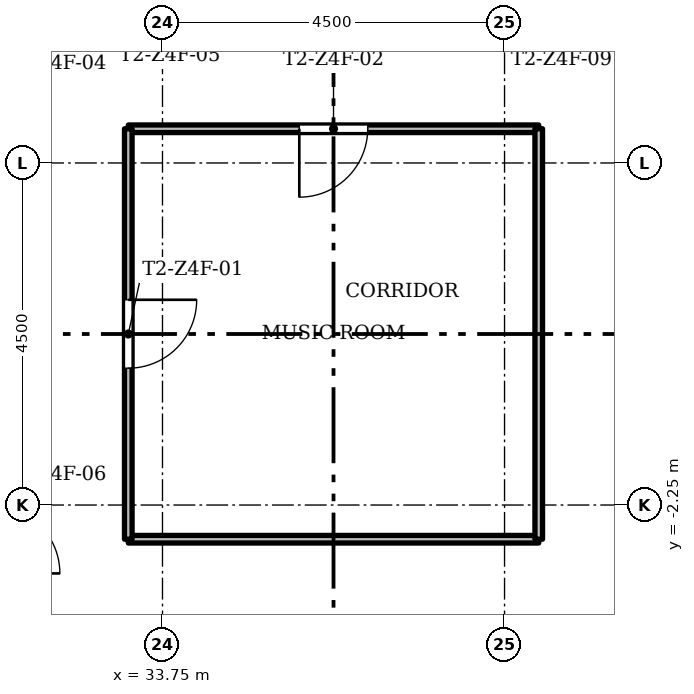
"""IFC4 building model, lengths in metres.
Left out: names, types, materials, properties, quantities, classifications, styles, units other than length and angle.
Written with IfcOpenShell. Run it as: python <this file> out.ifc"""

import sys

from ifc_helpers import new_model, si_unit, direction, frame, frame_2d, origin, place, context, subcontext, project, spatial, rectangle, extrude, element, fill, save


model = new_model("IFC4")
c1 = context("Model", 3, precision=1e-05, world=origin(), true_north=direction((0.0, 1.0)))
c2 = subcontext(c1, "Body", "Model", "MODEL_VIEW")
j1 = project(units=[si_unit("LENGTHUNIT", "METRE"), si_unit("PLANEANGLEUNIT", "RADIAN")], contexts=[c1])
p1 = place(None, origin())
s1 = spatial("IfcSite", under=j1, at=p1, CompositionType="ELEMENT")
p2 = place(p1, origin())
s2 = spatial("IfcBuilding", under=s1, at=p2, CompositionType="ELEMENT")
p3 = place(p2, frame((0.0, 0.0, 219.8)))
s3 = spatial("IfcBuildingStorey", under=s2, at=p3, CompositionType="ELEMENT", Elevation=219.8)
p4 = place(p3, frame((38.7, -2.7, 0.0), z_axis=(0.0, 0.0, 1.0), x_axis=(-1.0, 0.0, 0.0)))
e1 = element("IfcWall", 1, at=p4, inside=s3, PredefinedType="PARTITIONING", context=c2, shape_type="SweptSolid", body=[
    extrude(rectangle(XDim=5.4, YDim=0.1, at=frame_2d((2.7, 0.0))), origin(), (0.0, 0.0, 1.0), 3.0),
])
p5 = place(p3, frame((38.7, 2.7, 0.0), z_axis=(0.0, 0.0, 1.0), x_axis=(-1.0, 0.0, 0.0)))
e2 = element("IfcWall", 2, at=p5, inside=s3, PredefinedType="PARTITIONING", context=c2, shape_type="SweptSolid", body=[
    extrude(rectangle(XDim=5.4, YDim=0.1, at=frame_2d((2.7, 0.0))), origin(), (0.0, 0.0, 1.0), 3.0),
])
p6 = place(p5, frame((2.25, 0.0, 0.0)))
e3 = element("IfcOpeningElement", 3, at=p6, cuts=e2, PredefinedType="OPENING", context=c2, shape_type="SweptSolid", body=[
    extrude(rectangle(XDim=0.9, YDim=2.1, at=frame_2d((0.45, 1.05))), frame((0.0, 0.06, 0.0), z_axis=(0.0, -1.0, 0.0), x_axis=(1.0, 0.0, 0.0)), (0.0, 0.0, 1.0), 0.12),
])
p7 = place(p3, frame((38.7, -2.7, 0.0), z_axis=(0.0, 0.0, 1.0), x_axis=(0.0, 1.0, 0.0)))
e4 = element("IfcWall", 4, at=p7, inside=s3, PredefinedType="PARTITIONING", context=c2, shape_type="SweptSolid", body=[
    extrude(rectangle(XDim=5.4, YDim=0.1, at=frame_2d((2.7, 0.0))), origin(), (0.0, 0.0, 1.0), 3.0),
])
p8 = place(p3, frame((33.3, -2.7, 0.0), z_axis=(0.0, 0.0, 1.0), x_axis=(0.0, 1.0, 0.0)))
e5 = element("IfcWall", 5, at=p8, inside=s3, PredefinedType="PARTITIONING", context=c2, shape_type="SweptSolid", body=[
    extrude(rectangle(XDim=5.4, YDim=0.1, at=frame_2d((2.7, 0.0))), origin(), (0.0, 0.0, 1.0), 3.0),
])
p9 = place(p8, frame((2.25, 0.0, 0.0)))
e6 = element("IfcOpeningElement", 6, at=p9, cuts=e5, PredefinedType="OPENING", context=c2, shape_type="SweptSolid", body=[
    extrude(rectangle(XDim=0.9, YDim=2.1, at=frame_2d((0.45, 1.05))), frame((0.0, 0.06, 0.0), z_axis=(0.0, -1.0, 0.0), x_axis=(1.0, 0.0, 0.0)), (0.0, 0.0, 1.0), 0.12),
])
p10 = place(p9, origin())
e7 = element("IfcDoor", 7, at=p10, inside=s3, OperationType="SINGLE_SWING_RIGHT", PredefinedType="DOOR", context=c2, shape_type="SweptSolid", body=[
    extrude(rectangle(XDim=0.9, YDim=2.1, at=frame_2d((0.45, 1.05))), frame((0.0, 0.025, 0.0), z_axis=(0.0, -1.0, 0.0), x_axis=(1.0, 0.0, 0.0)), (0.0, 0.0, 1.0), 0.05),
])
fill(e6, e7)
p11 = place(p6, origin())
e8 = element("IfcDoor", 8, at=p11, inside=s3, OperationType="SINGLE_SWING_LEFT", PredefinedType="DOOR", context=c2, shape_type="SweptSolid", body=[
    extrude(rectangle(XDim=0.9, YDim=2.1, at=frame_2d((0.45, 1.05))), frame((0.0, 0.025, 0.0), z_axis=(0.0, -1.0, 0.0), x_axis=(1.0, 0.0, 0.0)), (0.0, 0.0, 1.0), 0.05),
])
fill(e3, e8)
save(model, sys.argv[1])
